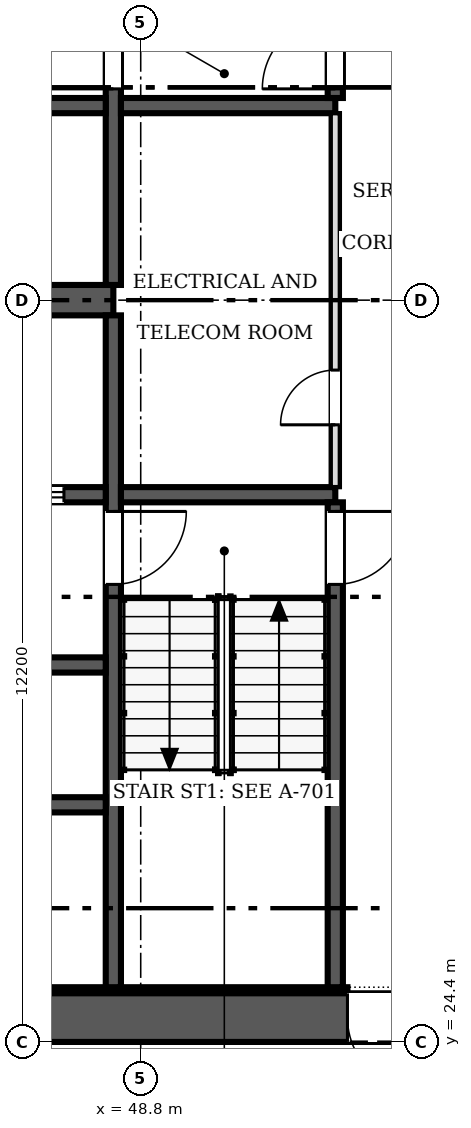
"""IFC4 building model, lengths in metres.
Left out: names, types, materials, properties, quantities, classifications, styles, units other than length and angle.
Written with IfcOpenShell. Run it as: python <this file> out.ifc"""

import sys

from ifc_helpers import new_model, si_unit, direction, frame, frame_2d, origin, place, context, subcontext, project, spatial, rectangle, extrude, source, transform, mapped, element, fill, save


model = new_model("IFC4")
c1 = context("Model", 3, precision=1e-05, world=origin(), true_north=direction((0.0, 1.0)))
c2 = subcontext(c1, "Body", "Model", "MODEL_VIEW")
j1 = project(units=[si_unit("LENGTHUNIT", "METRE"), si_unit("PLANEANGLEUNIT", "RADIAN")], contexts=[c1])
p1 = place(None, origin())
s1 = spatial("IfcSite", under=j1, at=p1, CompositionType="ELEMENT")
p2 = place(p1, origin())
s2 = spatial("IfcBuilding", under=s1, at=p2, CompositionType="ELEMENT")
p3 = place(p2, frame((0.0, 0.0, 99.0)))
s3 = spatial("IfcBuildingStorey", under=s2, at=p3, CompositionType="ELEMENT", Elevation=99.0)
p4 = place(p3, frame((54.9, 24.8, 0.0), z_axis=(0.0, 0.0, 1.0), x_axis=(-1.0, 0.0, 0.0)))
e1 = element("IfcWall", 1, at=p4, inside=s3, PredefinedType="SHEAR", context=c2, shape_type="SweptSolid", body=[
    extrude(rectangle(XDim=24.4, YDim=0.8, at=frame_2d((12.2, 0.0))), origin(), (0.0, 0.0, 1.0), 3.8),
])
m1 = source(origin(), c2, "Body", "SweptSolid", [
    extrude(rectangle(XDim=1.2, YDim=2.1, at=frame_2d((0.6, 1.05))), frame((0.0, 0.41, 0.0), z_axis=(0.0, -1.0, 0.0), x_axis=(1.0, 0.0, 0.0)), (0.0, 0.0, 1.0), 0.82),
])
p5 = place(p4, frame((1.5, 0.0, 0.0)))
e2 = element("IfcOpeningElement", 2, at=p5, cuts=e1, PredefinedType="OPENING", context=c2, shape_type="MappedRepresentation", body=[
    mapped(m1, transform((0.0, 0.0, 0.0), scale=1.0)),
])
p6 = place(p3, frame((31.3, 25.25, 0.0), z_axis=(0.0, 0.0, 1.0), x_axis=(1.0, 0.0, 0.0)))
e3 = element("IfcWall", 3, at=p6, inside=s3, PredefinedType="SOLIDWALL", context=c2, shape_type="SweptSolid", body=[
    extrude(rectangle(XDim=20.9, YDim=0.1, at=frame_2d((10.45, 0.0))), origin(), (0.0, 0.0, 1.0), 3.8),
])
p7 = place(p3, frame((31.4, 36.6, 0.0), z_axis=(0.0, 0.0, 1.0), x_axis=(1.0, 0.0, 0.0)))
e4 = element("IfcWall", 4, at=p7, inside=s3, PredefinedType="SHEAR", context=c2, shape_type="SweptSolid", body=[
    extrude(rectangle(XDim=16.95, YDim=0.5, at=frame_2d((8.475, 0.0))), origin(), (0.0, 0.0, 1.0), 3.8),
])
p8 = place(p3, frame((48.35, 36.35, 0.0), z_axis=(0.0, 0.0, 1.0), x_axis=(0.0, -1.0, 0.0)))
e5 = element("IfcWall", 5, at=p8, inside=s3, PredefinedType="SOLIDWALL", context=c2, shape_type="SweptSolid", body=[
    extrude(rectangle(XDim=11.05, YDim=0.25, at=frame_2d((5.525, 0.0))), origin(), (0.0, 0.0, 1.0), 3.8),
])
m2 = source(origin(), c2, "Body", "SweptSolid", [
    extrude(rectangle(XDim=1.2, YDim=2.1, at=frame_2d((0.6, 1.05))), frame((0.0, 0.135, 0.0), z_axis=(0.0, -1.0, 0.0), x_axis=(1.0, 0.0, 0.0)), (0.0, 0.0, 1.0), 0.27),
])
p9 = place(p8, frame((3.225, 0.0, 0.0)))
e6 = element("IfcOpeningElement", 6, at=p9, cuts=e5, PredefinedType="OPENING", context=c2, shape_type="MappedRepresentation", body=[
    mapped(m2, transform((0.0, 0.0, 0.0), scale=1.0)),
])
p10 = place(p3, frame((48.35, 47.9, 0.0), z_axis=(0.0, 0.0, 1.0), x_axis=(0.0, -1.0, 0.0)))
e7 = element("IfcWall", 7, at=p10, inside=s3, PredefinedType="SOLIDWALL", context=c2, shape_type="SweptSolid", body=[
    extrude(rectangle(XDim=11.05, YDim=0.25, at=frame_2d((5.525, 0.0))), origin(), (0.0, 0.0, 1.0), 3.8),
])
p11 = place(p10, frame((6.625, 0.0, 0.0)))
e8 = element("IfcOpeningElement", 8, at=p11, cuts=e7, PredefinedType="OPENING", context=c2, shape_type="MappedRepresentation", body=[
    mapped(m2, transform((0.0, 0.0, 0.0), scale=1.0)),
])
p12 = place(p3, frame((48.225, 33.4, 0.0), z_axis=(0.0, 0.0, 1.0), x_axis=(-1.0, 0.0, 0.0)))
e9 = element("IfcWall", 9, at=p12, inside=s3, PredefinedType="SOLIDWALL", context=c2, shape_type="SweptSolid", body=[
    extrude(rectangle(XDim=5.275, YDim=0.25, at=frame_2d((2.638, 0.0))), origin(), (0.0, 0.0, 1.0), 3.8),
])
p13 = place(p12, frame((3.512, 0.0, 0.0)))
e10 = element("IfcOpeningElement", 10, at=p13, cuts=e9, PredefinedType="OPENING", context=c2, shape_type="MappedRepresentation", body=[
    mapped(m2, transform((0.0, 0.0, 0.0), scale=1.0)),
])
p14 = place(p12, frame((0.688, 0.0, 0.0)))
e11 = element("IfcOpeningElement", 11, at=p14, cuts=e9, PredefinedType="OPENING", context=c2, shape_type="MappedRepresentation", body=[
    mapped(m2, transform((0.0, 0.0, 0.0), scale=1.0)),
])
p15 = place(p3, frame((48.475, 33.4, 0.0), z_axis=(0.0, 0.0, 1.0), x_axis=(1.0, 0.0, 0.0)))
e12 = element("IfcWall", 12, at=p15, inside=s3, PredefinedType="SOLIDWALL", context=c2, shape_type="SweptSolid", body=[
    extrude(rectangle(XDim=3.525, YDim=0.25, at=frame_2d((1.762, 0.0))), origin(), (0.0, 0.0, 1.0), 3.8),
])
for number, where, z_axis, x_axis in (
    (13, (42.95, 28.3, 0.0), (0.0, 0.0, 1.0), (1.0, 0.0, 0.0)),
    (14, (42.95, 39.8, 0.0), (0.0, 0.0, 1.0), (1.0, 0.0, 0.0)),
):
    element("IfcWall", number, at=place(p3, frame(where, z_axis=z_axis, x_axis=x_axis)), inside=s3, PredefinedType="SOLIDWALL", context=c2, shape_type="SweptSolid", body=[
        extrude(rectangle(XDim=5.275, YDim=0.25, at=frame_2d((2.638, 0.0))), origin(), (0.0, 0.0, 1.0), 3.8),
    ])
p16 = place(p3, frame((48.475, 39.8, 0.0), z_axis=(0.0, 0.0, 1.0), x_axis=(1.0, 0.0, 0.0)))
e15 = element("IfcWall", 15, at=p16, inside=s3, PredefinedType="SOLIDWALL", context=c2, shape_type="SweptSolid", body=[
    extrude(rectangle(XDim=3.525, YDim=0.25, at=frame_2d((1.762, 0.0))), origin(), (0.0, 0.0, 1.0), 3.8),
])
p17 = place(p3, frame((52.0, 25.3, 0.0), z_axis=(0.0, 0.0, 1.0), x_axis=(0.0, 1.0, 0.0)))
e16 = element("IfcWall", 16, at=p17, inside=s3, PredefinedType="SOLIDWALL", context=c2, shape_type="SweptSolid", body=[
    extrude(rectangle(XDim=7.975, YDim=0.25, at=frame_2d((3.987, 0.0))), origin(), (0.0, 0.0, 1.0), 3.8),
])
p18 = place(p17, frame((6.625, 0.0, 0.0)))
e17 = element("IfcOpeningElement", 17, at=p18, cuts=e16, PredefinedType="OPENING", context=c2, shape_type="MappedRepresentation", body=[
    mapped(m2, transform((0.0, 0.0, 0.0), scale=1.0)),
])
p19 = place(p3, frame((52.0, 39.925, 0.0), z_axis=(0.0, 0.0, 1.0), x_axis=(0.0, 1.0, 0.0)))
e18 = element("IfcWall", 18, at=p19, inside=s3, PredefinedType="SOLIDWALL", context=c2, shape_type="SweptSolid", body=[
    extrude(rectangle(XDim=7.975, YDim=0.25, at=frame_2d((3.987, 0.0))), origin(), (0.0, 0.0, 1.0), 3.8),
])
p20 = place(p19, frame((0.15, 0.0, 0.0)))
e19 = element("IfcOpeningElement", 19, at=p20, cuts=e18, PredefinedType="OPENING", context=c2, shape_type="MappedRepresentation", body=[
    mapped(m2, transform((0.0, 0.0, 0.0), scale=1.0)),
])
p21 = place(p3, frame((42.95, 30.6, 0.0), z_axis=(0.0, 0.0, 1.0), x_axis=(1.0, 0.0, 0.0)))
e20 = element("IfcWall", 20, at=p21, inside=s3, PredefinedType="SOLIDWALL", context=c2, shape_type="SweptSolid", body=[
    extrude(rectangle(XDim=5.275, YDim=0.25, at=frame_2d((2.638, 0.0))), origin(), (0.0, 0.0, 1.0), 3.8),
])
p22 = place(p3, frame((52.0, 33.525, 0.0), z_axis=(0.0, 0.0, 1.0), x_axis=(0.0, 1.0, 0.0)))
e21 = element("IfcWall", 21, at=p22, inside=s3, PredefinedType="PARTITIONING", context=c2, shape_type="SweptSolid", body=[
    extrude(rectangle(XDim=6.15, YDim=0.15, at=frame_2d((3.075, 0.0))), origin(), (0.0, 0.0, 1.0), 3.6),
])
m3 = source(origin(), c2, "Body", "SweptSolid", [
    extrude(rectangle(XDim=0.9, YDim=2.1, at=frame_2d((0.45, 1.05))), frame((0.0, 0.085, 0.0), z_axis=(0.0, -1.0, 0.0), x_axis=(1.0, 0.0, 0.0)), (0.0, 0.0, 1.0), 0.17),
])
p23 = place(p22, frame((1.025, 0.0, 0.0)))
e22 = element("IfcOpeningElement", 22, at=p23, cuts=e21, PredefinedType="OPENING", context=c2, shape_type="MappedRepresentation", body=[
    mapped(m3, transform((0.0, 0.0, 0.0), scale=1.0)),
])
m4 = source(origin(), c2, "Body", "SweptSolid", [
    extrude(rectangle(XDim=1.2, YDim=2.1, at=frame_2d((0.6, 1.05))), frame((0.0, 0.025, 0.0), z_axis=(0.0, -1.0, 0.0), x_axis=(1.0, 0.0, 0.0)), (0.0, 0.0, 1.0), 0.05),
])
p24 = place(p5, origin())
e23 = element("IfcDoor", 23, at=p24, inside=s3, OperationType="SINGLE_SWING_LEFT", PredefinedType="DOOR", context=c2, shape_type="MappedRepresentation", body=[
    mapped(m4, transform((0.0, 0.0, 0.0), scale=1.0)),
])
fill(e2, e23)
p25 = place(p9, origin())
e24 = element("IfcDoor", 24, at=p25, inside=s3, OperationType="SINGLE_SWING_LEFT", PredefinedType="DOOR", context=c2, shape_type="MappedRepresentation", body=[
    mapped(m4, transform((0.0, 0.0, 0.0), scale=1.0)),
])
fill(e6, e24)
p26 = place(p11, origin())
e25 = element("IfcDoor", 25, at=p26, inside=s3, OperationType="SINGLE_SWING_RIGHT", PredefinedType="DOOR", context=c2, shape_type="MappedRepresentation", body=[
    mapped(m4, transform((0.0, 0.0, 0.0), scale=1.0)),
])
fill(e8, e25)
p27 = place(p14, origin())
e26 = element("IfcDoor", 26, at=p27, inside=s3, OperationType="DOUBLE_DOOR_SLIDING", PredefinedType="DOOR", context=c2, shape_type="MappedRepresentation", body=[
    mapped(m4, transform((0.0, 0.0, 0.0), scale=1.0)),
])
fill(e11, e26)
p28 = place(p18, origin())
e27 = element("IfcDoor", 27, at=p28, inside=s3, OperationType="SINGLE_SWING_RIGHT", PredefinedType="DOOR", context=c2, shape_type="MappedRepresentation", body=[
    mapped(m4, transform((0.0, 0.0, 0.0), scale=1.0)),
])
fill(e17, e27)
p29 = place(p20, origin())
e28 = element("IfcDoor", 28, at=p29, inside=s3, OperationType="SINGLE_SWING_LEFT", PredefinedType="DOOR", context=c2, shape_type="MappedRepresentation", body=[
    mapped(m4, transform((0.0, 0.0, 0.0), scale=1.0)),
])
fill(e19, e28)
m5 = source(origin(), c2, "Body", "SweptSolid", [
    extrude(rectangle(XDim=0.9, YDim=2.1, at=frame_2d((0.45, 1.05))), frame((0.0, 0.025, 0.0), z_axis=(0.0, -1.0, 0.0), x_axis=(1.0, 0.0, 0.0)), (0.0, 0.0, 1.0), 0.05),
])
p30 = place(p23, origin())
e29 = element("IfcDoor", 29, at=p30, inside=s3, OperationType="SINGLE_SWING_LEFT", PredefinedType="DOOR", context=c2, shape_type="MappedRepresentation", body=[
    mapped(m5, transform((0.0, 0.0, 0.0), scale=1.0)),
])
fill(e22, e29)
save(model, sys.argv[1])
